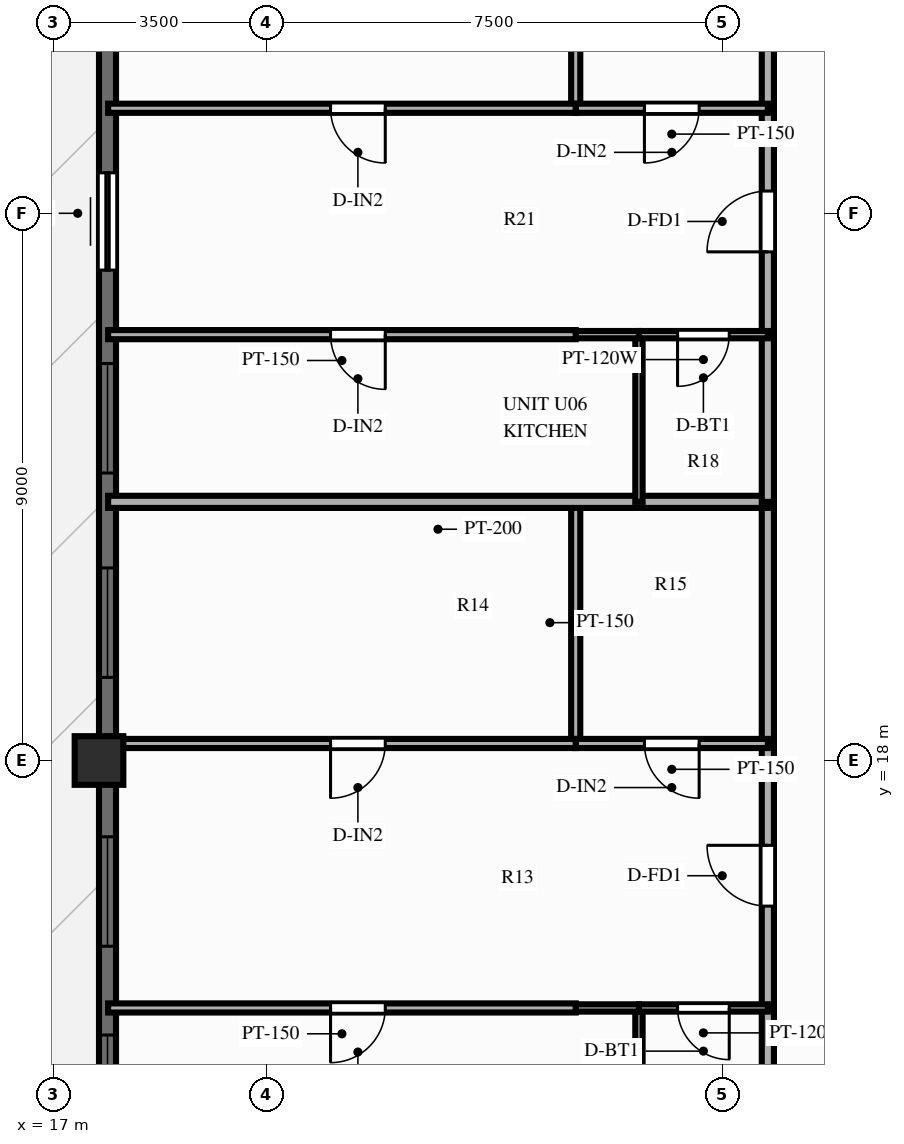
"""IFC4 building model, lengths in metres.
Left out: names, types, materials, properties, quantities, classifications, styles, units other than length and angle.
Written with IfcOpenShell. Run it as: python <this file> out.ifc"""

import sys

from ifc_helpers import new_model, si_unit, direction, frame, frame_2d, origin, origin_2d, place, context, subcontext, project, spatial, rectangle, extrude, source, transform, mapped, element, fill, save


model = new_model("IFC4")
c1 = context("Model", 3, precision=1e-05, world=origin(), true_north=direction((0.0, 1.0)))
c2 = subcontext(c1, "Body", "Model", "MODEL_VIEW")
j1 = project(units=[si_unit("LENGTHUNIT", "METRE"), si_unit("PLANEANGLEUNIT", "RADIAN")], contexts=[c1])
p1 = place(None, origin())
s1 = spatial("IfcSite", under=j1, at=p1, CompositionType="ELEMENT")
p2 = place(p1, origin())
s2 = spatial("IfcBuilding", under=s1, at=p2, CompositionType="ELEMENT")
p3 = place(p2, frame((0.0, 0.0, 182.8)))
s3 = spatial("IfcBuildingStorey", under=s2, at=p3, CompositionType="ELEMENT", Elevation=182.8)
m1 = source(origin(), c2, "Body", "SweptSolid", [
    extrude(rectangle(XDim=0.8, YDim=0.8, at=origin_2d()), origin(), (0.0, 0.0, 1.0), 3.9),
])
p4 = place(p3, frame((17.75, 18.0, 0.0), z_axis=(0.0, 0.0, 1.0), x_axis=(1.0, 0.0, 0.0)))
e1 = element("IfcColumn", 1, at=p4, inside=s3, PredefinedType="COLUMN", context=c2, shape_type="MappedRepresentation", body=[
    mapped(m1, transform((0.0, 0.0, 0.0), scale=1.0)),
])
p5 = place(p3, frame((17.89, 11.0, 0.0), z_axis=(0.0, 0.0, 1.0), x_axis=(0.0, 1.0, 0.0)))
e2 = element("IfcWall", 2, at=p5, inside=s3, PredefinedType="SOLIDWALL", context=c2, shape_type="SweptSolid", body=[
    extrude(rectangle(XDim=32.0, YDim=0.28, at=frame_2d((16.0, 0.0))), origin(), (0.0, 0.0, 1.0), 2.79),
])
p6 = place(p5, frame((0.685, 0.0, 0.85)))
e3 = element("IfcOpeningElement", 3, at=p6, cuts=e2, PredefinedType="OPENING", context=c2, shape_type="SweptSolid", body=[
    extrude(rectangle(XDim=1.8, YDim=1.65, at=frame_2d((0.9, 0.825))), frame((0.0, 0.152, 0.0), z_axis=(0.0, -1.0, 0.0), x_axis=(1.0, 0.0, 0.0)), (0.0, 0.0, 1.0), 0.304),
])
p7 = place(p5, frame((3.945, 0.0, 0.85)))
e4 = element("IfcOpeningElement", 4, at=p7, cuts=e2, PredefinedType="OPENING", context=c2, shape_type="SweptSolid", body=[
    extrude(rectangle(XDim=1.8, YDim=1.65, at=frame_2d((0.9, 0.825))), frame((0.0, 0.152, 0.0), z_axis=(0.0, -1.0, 0.0), x_axis=(1.0, 0.0, 0.0)), (0.0, 0.0, 1.0), 0.304),
])
p8 = place(p5, frame((8.367, 0.0, 0.85)))
e5 = element("IfcOpeningElement", 5, at=p8, cuts=e2, PredefinedType="OPENING", context=c2, shape_type="SweptSolid", body=[
    extrude(rectangle(XDim=1.8, YDim=1.65, at=frame_2d((0.9, 0.825))), frame((0.0, 0.152, 0.0), z_axis=(0.0, -1.0, 0.0), x_axis=(1.0, 0.0, 0.0)), (0.0, 0.0, 1.0), 0.304),
])
p9 = place(p5, frame((11.729, 0.0, 0.85)))
e6 = element("IfcOpeningElement", 6, at=p9, cuts=e2, PredefinedType="OPENING", context=c2, shape_type="SweptSolid", body=[
    extrude(rectangle(XDim=1.8, YDim=1.65, at=frame_2d((0.9, 0.825))), frame((0.0, 0.152, 0.0), z_axis=(0.0, -1.0, 0.0), x_axis=(1.0, 0.0, 0.0)), (0.0, 0.0, 1.0), 0.304),
])
p10 = place(p5, frame((15.066, 0.0, 0.0)))
e7 = element("IfcOpeningElement", 7, at=p10, cuts=e2, PredefinedType="OPENING", context=c2, shape_type="SweptSolid", body=[
    extrude(rectangle(XDim=1.6, YDim=2.15, at=frame_2d((0.8, 1.075))), frame((0.0, 0.152, 0.0), z_axis=(0.0, -1.0, 0.0), x_axis=(1.0, 0.0, 0.0)), (0.0, 0.0, 1.0), 0.304),
])
p11 = place(p5, frame((18.811, 0.0, 0.85)))
e8 = element("IfcOpeningElement", 8, at=p11, cuts=e2, PredefinedType="OPENING", context=c2, shape_type="SweptSolid", body=[
    extrude(rectangle(XDim=1.8, YDim=1.65, at=frame_2d((0.9, 0.825))), frame((0.0, 0.152, 0.0), z_axis=(0.0, -1.0, 0.0), x_axis=(1.0, 0.0, 0.0)), (0.0, 0.0, 1.0), 0.304),
])
p12 = place(p5, frame((22.17, 0.0, 0.85)))
e9 = element("IfcOpeningElement", 9, at=p12, cuts=e2, PredefinedType="OPENING", context=c2, shape_type="SweptSolid", body=[
    extrude(rectangle(XDim=1.8, YDim=1.65, at=frame_2d((0.9, 0.825))), frame((0.0, 0.152, 0.0), z_axis=(0.0, -1.0, 0.0), x_axis=(1.0, 0.0, 0.0)), (0.0, 0.0, 1.0), 0.304),
])
p13 = place(p5, frame((25.706, 0.0, 0.85)))
e10 = element("IfcOpeningElement", 10, at=p13, cuts=e2, PredefinedType="OPENING", context=c2, shape_type="SweptSolid", body=[
    extrude(rectangle(XDim=1.8, YDim=1.65, at=frame_2d((0.9, 0.825))), frame((0.0, 0.152, 0.0), z_axis=(0.0, -1.0, 0.0), x_axis=(1.0, 0.0, 0.0)), (0.0, 0.0, 1.0), 0.304),
])
p14 = place(p5, frame((28.966, 0.0, 0.85)))
e11 = element("IfcOpeningElement", 11, at=p14, cuts=e2, PredefinedType="OPENING", context=c2, shape_type="SweptSolid", body=[
    extrude(rectangle(XDim=1.8, YDim=1.65, at=frame_2d((0.9, 0.825))), frame((0.0, 0.152, 0.0), z_axis=(0.0, -1.0, 0.0), x_axis=(1.0, 0.0, 0.0)), (0.0, 0.0, 1.0), 0.304),
])
p15 = place(p3, frame((28.75, 11.18, 0.0), z_axis=(0.0, 0.0, 1.0), x_axis=(0.0, 1.0, 0.0)))
e12 = element("IfcWall", 12, at=p15, inside=s3, PredefinedType="PARTITIONING", context=c2, shape_type="SweptSolid", body=[
    extrude(rectangle(XDim=2.75, YDim=0.2, at=frame_2d((1.375, 0.0))), origin(), (0.0, 0.0, 1.0), 3.69),
])
p16 = place(p3, frame((28.75, 13.93, 0.0), z_axis=(0.0, 0.0, 1.0), x_axis=(0.0, 1.0, 0.0)))
e13 = element("IfcWall", 13, at=p16, inside=s3, PredefinedType="PARTITIONING", context=c2, shape_type="SweptSolid", body=[
    extrude(rectangle(XDim=4.35, YDim=0.2, at=frame_2d((2.175, 0.0))), origin(), (0.0, 0.0, 1.0), 3.69),
])
p17 = place(p16, frame((1.675, 0.0, 0.0)))
e14 = element("IfcOpeningElement", 14, at=p17, cuts=e13, PredefinedType="OPENING", context=c2, shape_type="SweptSolid", body=[
    extrude(rectangle(XDim=1.0, YDim=2.15, at=frame_2d((0.5, 1.075))), frame((0.0, 0.112, 0.0), z_axis=(0.0, -1.0, 0.0), x_axis=(1.0, 0.0, 0.0)), (0.0, 0.0, 1.0), 0.224),
])
p18 = place(p3, frame((28.75, 18.28, 0.0), z_axis=(0.0, 0.0, 1.0), x_axis=(0.0, 1.0, 0.0)))
e15 = element("IfcWall", 15, at=p18, inside=s3, PredefinedType="PARTITIONING", context=c2, shape_type="SweptSolid", body=[
    extrude(rectangle(XDim=3.974, YDim=0.2, at=frame_2d((1.987, 0.0))), origin(), (0.0, 0.0, 1.0), 3.69),
])
p19 = place(p3, frame((26.63, 11.18, 0.0), z_axis=(0.0, 0.0, 1.0), x_axis=(0.0, 1.0, 0.0)))
e16 = element("IfcWall", 16, at=p19, inside=s3, PredefinedType="PARTITIONING", context=c2, shape_type="SweptSolid", body=[
    extrude(rectangle(XDim=2.75, YDim=0.12, at=frame_2d((1.375, 0.0))), origin(), (0.0, 0.0, 1.0), 3.69),
])
p20 = place(p3, frame((25.59, 18.28, 0.0), z_axis=(0.0, 0.0, 1.0), x_axis=(0.0, 1.0, 0.0)))
e17 = element("IfcWall", 17, at=p20, inside=s3, PredefinedType="PARTITIONING", context=c2, shape_type="SweptSolid", body=[
    extrude(rectangle(XDim=3.974, YDim=0.15, at=frame_2d((1.987, 0.0))), origin(), (0.0, 0.0, 1.0), 3.69),
])
p21 = place(p3, frame((28.75, 13.93, 0.0), z_axis=(0.0, 0.0, 1.0), x_axis=(-1.0, 0.0, 0.0)))
e18 = element("IfcWall", 18, at=p21, inside=s3, PredefinedType="PARTITIONING", context=c2, shape_type="SweptSolid", body=[
    extrude(rectangle(XDim=2.12, YDim=0.12, at=frame_2d((1.06, 0.0))), origin(), (0.0, 0.0, 1.0), 3.69),
])
p22 = place(p21, frame((0.635, 0.0, 0.0)))
e19 = element("IfcOpeningElement", 19, at=p22, cuts=e18, PredefinedType="OPENING", context=c2, shape_type="SweptSolid", body=[
    extrude(rectangle(XDim=0.85, YDim=2.05, at=frame_2d((0.425, 1.025))), frame((0.0, 0.072, 0.0), z_axis=(0.0, -1.0, 0.0), x_axis=(1.0, 0.0, 0.0)), (0.0, 0.0, 1.0), 0.144),
])
p23 = place(p3, frame((26.63, 13.93, 0.0), z_axis=(0.0, 0.0, 1.0), x_axis=(-1.0, 0.0, 0.0)))
e20 = element("IfcWall", 20, at=p23, inside=s3, PredefinedType="PARTITIONING", context=c2, shape_type="SweptSolid", body=[
    extrude(rectangle(XDim=1.04, YDim=0.12, at=frame_2d((0.52, 0.0))), origin(), (0.0, 0.0, 1.0), 3.69),
])
p24 = place(p3, frame((25.59, 13.93, 0.0), z_axis=(0.0, 0.0, 1.0), x_axis=(-1.0, 0.0, 0.0)))
e21 = element("IfcWall", 21, at=p24, inside=s3, PredefinedType="PARTITIONING", context=c2, shape_type="SweptSolid", body=[
    extrude(rectangle(XDim=7.69, YDim=0.15, at=frame_2d((3.845, 0.0))), origin(), (0.0, 0.0, 1.0), 3.69),
])
p25 = place(p24, frame((3.132, 0.0, 0.0)))
e22 = element("IfcOpeningElement", 22, at=p25, cuts=e21, PredefinedType="OPENING", context=c2, shape_type="SweptSolid", body=[
    extrude(rectangle(XDim=0.9, YDim=2.1, at=frame_2d((0.45, 1.05))), frame((0.0, 0.087, 0.0), z_axis=(0.0, -1.0, 0.0), x_axis=(1.0, 0.0, 0.0)), (0.0, 0.0, 1.0), 0.174),
])
p26 = place(p3, frame((28.75, 18.28, 0.0), z_axis=(0.0, 0.0, 1.0), x_axis=(-1.0, 0.0, 0.0)))
e23 = element("IfcWall", 23, at=p26, inside=s3, PredefinedType="PARTITIONING", context=c2, shape_type="SweptSolid", body=[
    extrude(rectangle(XDim=3.16, YDim=0.15, at=frame_2d((1.58, 0.0))), origin(), (0.0, 0.0, 1.0), 3.69),
])
p27 = place(p26, frame((1.13, 0.0, 0.0)))
e24 = element("IfcOpeningElement", 24, at=p27, cuts=e23, PredefinedType="OPENING", context=c2, shape_type="SweptSolid", body=[
    extrude(rectangle(XDim=0.9, YDim=2.1, at=frame_2d((0.45, 1.05))), frame((0.0, 0.087, 0.0), z_axis=(0.0, -1.0, 0.0), x_axis=(1.0, 0.0, 0.0)), (0.0, 0.0, 1.0), 0.174),
])
p28 = place(p3, frame((25.59, 18.28, 0.0), z_axis=(0.0, 0.0, 1.0), x_axis=(-1.0, 0.0, 0.0)))
e25 = element("IfcWall", 25, at=p28, inside=s3, PredefinedType="PARTITIONING", context=c2, shape_type="SweptSolid", body=[
    extrude(rectangle(XDim=7.69, YDim=0.15, at=frame_2d((3.845, 0.0))), origin(), (0.0, 0.0, 1.0), 3.69),
])
p29 = place(p28, frame((3.132, 0.0, 0.0)))
e26 = element("IfcOpeningElement", 26, at=p29, cuts=e25, PredefinedType="OPENING", context=c2, shape_type="SweptSolid", body=[
    extrude(rectangle(XDim=0.9, YDim=2.1, at=frame_2d((0.45, 1.05))), frame((0.0, 0.087, 0.0), z_axis=(0.0, -1.0, 0.0), x_axis=(1.0, 0.0, 0.0)), (0.0, 0.0, 1.0), 0.174),
])
p30 = place(p3, frame((28.75, 22.254, 0.0), z_axis=(0.0, 0.0, 1.0), x_axis=(-1.0, 0.0, 0.0)))
e27 = element("IfcWall", 27, at=p30, inside=s3, PredefinedType="PARTITIONING", context=c2, shape_type="SweptSolid", body=[
    extrude(rectangle(XDim=10.85, YDim=0.2, at=frame_2d((5.425, 0.0))), origin(), (0.0, 0.0, 1.0), 3.29),
])
p31 = place(p3, frame((28.75, 22.254, 0.0), z_axis=(0.0, 0.0, 1.0), x_axis=(0.0, 1.0, 0.0)))
e28 = element("IfcWall", 28, at=p31, inside=s3, PredefinedType="PARTITIONING", context=c2, shape_type="SweptSolid", body=[
    extrude(rectangle(XDim=2.75, YDim=0.2, at=frame_2d((1.375, 0.0))), origin(), (0.0, 0.0, 1.0), 3.69),
])
p32 = place(p3, frame((28.75, 25.004, 0.0), z_axis=(0.0, 0.0, 1.0), x_axis=(0.0, 1.0, 0.0)))
e29 = element("IfcWall", 29, at=p32, inside=s3, PredefinedType="PARTITIONING", context=c2, shape_type="SweptSolid", body=[
    extrude(rectangle(XDim=3.724, YDim=0.2, at=frame_2d((1.862, 0.0))), origin(), (0.0, 0.0, 1.0), 3.69),
])
p33 = place(p32, frame((1.362, 0.0, 0.0)))
e30 = element("IfcOpeningElement", 30, at=p33, cuts=e29, PredefinedType="OPENING", context=c2, shape_type="SweptSolid", body=[
    extrude(rectangle(XDim=1.0, YDim=2.15, at=frame_2d((0.5, 1.075))), frame((0.0, 0.112, 0.0), z_axis=(0.0, -1.0, 0.0), x_axis=(1.0, 0.0, 0.0)), (0.0, 0.0, 1.0), 0.224),
])
p34 = place(p3, frame((28.75, 28.728, 0.0), z_axis=(0.0, 0.0, 1.0), x_axis=(0.0, 1.0, 0.0)))
e31 = element("IfcWall", 31, at=p34, inside=s3, PredefinedType="PARTITIONING", context=c2, shape_type="SweptSolid", body=[
    extrude(rectangle(XDim=3.968, YDim=0.2, at=frame_2d((1.984, 0.0))), origin(), (0.0, 0.0, 1.0), 3.69),
])
p35 = place(p3, frame((26.63, 22.254, 0.0), z_axis=(0.0, 0.0, 1.0), x_axis=(0.0, 1.0, 0.0)))
e32 = element("IfcWall", 32, at=p35, inside=s3, PredefinedType="PARTITIONING", context=c2, shape_type="SweptSolid", body=[
    extrude(rectangle(XDim=2.75, YDim=0.12, at=frame_2d((1.375, 0.0))), origin(), (0.0, 0.0, 1.0), 3.69),
])
p36 = place(p3, frame((25.59, 28.728, 0.0), z_axis=(0.0, 0.0, 1.0), x_axis=(0.0, 1.0, 0.0)))
e33 = element("IfcWall", 33, at=p36, inside=s3, PredefinedType="PARTITIONING", context=c2, shape_type="SweptSolid", body=[
    extrude(rectangle(XDim=3.968, YDim=0.15, at=frame_2d((1.984, 0.0))), origin(), (0.0, 0.0, 1.0), 3.69),
])
p37 = place(p3, frame((28.75, 25.004, 0.0), z_axis=(0.0, 0.0, 1.0), x_axis=(-1.0, 0.0, 0.0)))
e34 = element("IfcWall", 34, at=p37, inside=s3, PredefinedType="PARTITIONING", context=c2, shape_type="SweptSolid", body=[
    extrude(rectangle(XDim=2.12, YDim=0.12, at=frame_2d((1.06, 0.0))), origin(), (0.0, 0.0, 1.0), 3.69),
])
p38 = place(p37, frame((0.635, 0.0, 0.0)))
e35 = element("IfcOpeningElement", 35, at=p38, cuts=e34, PredefinedType="OPENING", context=c2, shape_type="SweptSolid", body=[
    extrude(rectangle(XDim=0.85, YDim=2.05, at=frame_2d((0.425, 1.025))), frame((0.0, 0.072, 0.0), z_axis=(0.0, -1.0, 0.0), x_axis=(1.0, 0.0, 0.0)), (0.0, 0.0, 1.0), 0.144),
])
p39 = place(p3, frame((26.63, 25.004, 0.0), z_axis=(0.0, 0.0, 1.0), x_axis=(-1.0, 0.0, 0.0)))
e36 = element("IfcWall", 36, at=p39, inside=s3, PredefinedType="PARTITIONING", context=c2, shape_type="SweptSolid", body=[
    extrude(rectangle(XDim=1.04, YDim=0.12, at=frame_2d((0.52, 0.0))), origin(), (0.0, 0.0, 1.0), 3.69),
])
p40 = place(p3, frame((25.59, 25.004, 0.0), z_axis=(0.0, 0.0, 1.0), x_axis=(-1.0, 0.0, 0.0)))
e37 = element("IfcWall", 37, at=p40, inside=s3, PredefinedType="PARTITIONING", context=c2, shape_type="SweptSolid", body=[
    extrude(rectangle(XDim=7.69, YDim=0.15, at=frame_2d((3.845, 0.0))), origin(), (0.0, 0.0, 1.0), 3.69),
])
p41 = place(p40, frame((3.132, 0.0, 0.0)))
e38 = element("IfcOpeningElement", 38, at=p41, cuts=e37, PredefinedType="OPENING", context=c2, shape_type="SweptSolid", body=[
    extrude(rectangle(XDim=0.9, YDim=2.1, at=frame_2d((0.45, 1.05))), frame((0.0, 0.087, 0.0), z_axis=(0.0, -1.0, 0.0), x_axis=(1.0, 0.0, 0.0)), (0.0, 0.0, 1.0), 0.174),
])
p42 = place(p3, frame((28.75, 28.728, 0.0), z_axis=(0.0, 0.0, 1.0), x_axis=(-1.0, 0.0, 0.0)))
e39 = element("IfcWall", 39, at=p42, inside=s3, PredefinedType="PARTITIONING", context=c2, shape_type="SweptSolid", body=[
    extrude(rectangle(XDim=3.16, YDim=0.15, at=frame_2d((1.58, 0.0))), origin(), (0.0, 0.0, 1.0), 3.69),
])
p43 = place(p42, frame((1.13, 0.0, 0.0)))
e40 = element("IfcOpeningElement", 40, at=p43, cuts=e39, PredefinedType="OPENING", context=c2, shape_type="SweptSolid", body=[
    extrude(rectangle(XDim=0.9, YDim=2.1, at=frame_2d((0.45, 1.05))), frame((0.0, 0.087, 0.0), z_axis=(0.0, -1.0, 0.0), x_axis=(1.0, 0.0, 0.0)), (0.0, 0.0, 1.0), 0.174),
])
p44 = place(p3, frame((25.59, 28.728, 0.0), z_axis=(0.0, 0.0, 1.0), x_axis=(-1.0, 0.0, 0.0)))
e41 = element("IfcWall", 41, at=p44, inside=s3, PredefinedType="PARTITIONING", context=c2, shape_type="SweptSolid", body=[
    extrude(rectangle(XDim=7.69, YDim=0.15, at=frame_2d((3.845, 0.0))), origin(), (0.0, 0.0, 1.0), 3.69),
])
p45 = place(p44, frame((3.132, 0.0, 0.0)))
e42 = element("IfcOpeningElement", 42, at=p45, cuts=e41, PredefinedType="OPENING", context=c2, shape_type="SweptSolid", body=[
    extrude(rectangle(XDim=0.9, YDim=2.1, at=frame_2d((0.45, 1.05))), frame((0.0, 0.087, 0.0), z_axis=(0.0, -1.0, 0.0), x_axis=(1.0, 0.0, 0.0)), (0.0, 0.0, 1.0), 0.174),
])
m2 = source(origin(), c2, "Body", "SweptSolid", [
    extrude(rectangle(XDim=1.8, YDim=1.65, at=frame_2d((0.9, 0.825))), frame((0.0, 0.03, 0.0), z_axis=(0.0, -1.0, 0.0), x_axis=(1.0, 0.0, 0.0)), (0.0, 0.0, 1.0), 0.06),
])
p46 = place(p6, origin())
e43 = element("IfcWindow", 43, at=p46, inside=s3, PartitioningType="SINGLE_PANEL", PredefinedType="WINDOW", context=c2, shape_type="MappedRepresentation", body=[
    mapped(m2, transform((0.0, 0.0, 0.0), scale=1.0)),
])
fill(e3, e43)
p47 = place(p7, origin())
e44 = element("IfcWindow", 44, at=p47, inside=s3, PartitioningType="SINGLE_PANEL", PredefinedType="WINDOW", context=c2, shape_type="MappedRepresentation", body=[
    mapped(m2, transform((0.0, 0.0, 0.0), scale=1.0)),
])
fill(e4, e44)
p48 = place(p8, origin())
e45 = element("IfcWindow", 45, at=p48, inside=s3, PartitioningType="SINGLE_PANEL", PredefinedType="WINDOW", context=c2, shape_type="MappedRepresentation", body=[
    mapped(m2, transform((0.0, 0.0, 0.0), scale=1.0)),
])
fill(e5, e45)
p49 = place(p9, origin())
e46 = element("IfcWindow", 46, at=p49, inside=s3, PartitioningType="SINGLE_PANEL", PredefinedType="WINDOW", context=c2, shape_type="MappedRepresentation", body=[
    mapped(m2, transform((0.0, 0.0, 0.0), scale=1.0)),
])
fill(e6, e46)
m3 = source(origin(), c2, "Body", "SweptSolid", [
    extrude(rectangle(XDim=1.6, YDim=2.15, at=frame_2d((0.8, 1.075))), frame((0.0, 0.025, 0.0), z_axis=(0.0, -1.0, 0.0), x_axis=(1.0, 0.0, 0.0)), (0.0, 0.0, 1.0), 0.05),
])
p50 = place(p10, origin())
e47 = element("IfcDoor", 47, at=p50, inside=s3, OperationType="SLIDING_TO_LEFT", PredefinedType="DOOR", context=c2, shape_type="MappedRepresentation", body=[
    mapped(m3, transform((0.0, 0.0, 0.0), scale=1.0)),
])
fill(e7, e47)
m4 = source(origin(), c2, "Body", "SweptSolid", [
    extrude(rectangle(XDim=1.0, YDim=2.15, at=frame_2d((0.5, 1.075))), frame((0.0, 0.025, 0.0), z_axis=(0.0, -1.0, 0.0), x_axis=(1.0, 0.0, 0.0)), (0.0, 0.0, 1.0), 0.05),
])
p51 = place(p17, origin())
e48 = element("IfcDoor", 48, at=p51, inside=s3, OperationType="SINGLE_SWING_RIGHT", PredefinedType="DOOR", context=c2, shape_type="MappedRepresentation", body=[
    mapped(m4, transform((0.0, 0.0, 0.0), scale=1.0)),
])
fill(e14, e48)
m5 = source(origin(), c2, "Body", "SweptSolid", [
    extrude(rectangle(XDim=0.85, YDim=2.05, at=frame_2d((0.425, 1.025))), frame((0.0, 0.025, 0.0), z_axis=(0.0, -1.0, 0.0), x_axis=(1.0, 0.0, 0.0)), (0.0, 0.0, 1.0), 0.05),
])
p52 = place(p22, origin())
e49 = element("IfcDoor", 49, at=p52, inside=s3, OperationType="SINGLE_SWING_LEFT", PredefinedType="DOOR", context=c2, shape_type="MappedRepresentation", body=[
    mapped(m5, transform((0.0, 0.0, 0.0), scale=1.0)),
])
fill(e19, e49)
m6 = source(origin(), c2, "Body", "SweptSolid", [
    extrude(rectangle(XDim=0.9, YDim=2.1, at=frame_2d((0.45, 1.05))), frame((0.0, 0.025, 0.0), z_axis=(0.0, -1.0, 0.0), x_axis=(1.0, 0.0, 0.0)), (0.0, 0.0, 1.0), 0.05),
])
p53 = place(p25, origin())
e50 = element("IfcDoor", 50, at=p53, inside=s3, OperationType="SINGLE_SWING_RIGHT", PredefinedType="DOOR", context=c2, shape_type="MappedRepresentation", body=[
    mapped(m6, transform((0.0, 0.0, 0.0), scale=1.0)),
])
fill(e22, e50)
p54 = place(p27, origin())
e51 = element("IfcDoor", 51, at=p54, inside=s3, OperationType="SINGLE_SWING_LEFT", PredefinedType="DOOR", context=c2, shape_type="MappedRepresentation", body=[
    mapped(m6, transform((0.0, 0.0, 0.0), scale=1.0)),
])
fill(e24, e51)
p55 = place(p29, origin())
e52 = element("IfcDoor", 52, at=p55, inside=s3, OperationType="SINGLE_SWING_RIGHT", PredefinedType="DOOR", context=c2, shape_type="MappedRepresentation", body=[
    mapped(m6, transform((0.0, 0.0, 0.0), scale=1.0)),
])
fill(e26, e52)
p56 = place(p33, origin())
e53 = element("IfcDoor", 53, at=p56, inside=s3, OperationType="SINGLE_SWING_LEFT", PredefinedType="DOOR", context=c2, shape_type="MappedRepresentation", body=[
    mapped(m4, transform((0.0, 0.0, 0.0), scale=1.0)),
])
fill(e30, e53)
p57 = place(p38, origin())
e54 = element("IfcDoor", 54, at=p57, inside=s3, OperationType="SINGLE_SWING_RIGHT", PredefinedType="DOOR", context=c2, shape_type="MappedRepresentation", body=[
    mapped(m5, transform((0.0, 0.0, 0.0), scale=1.0)),
])
fill(e35, e54)
p58 = place(p41, origin())
e55 = element("IfcDoor", 55, at=p58, inside=s3, OperationType="SINGLE_SWING_LEFT", PredefinedType="DOOR", context=c2, shape_type="MappedRepresentation", body=[
    mapped(m6, transform((0.0, 0.0, 0.0), scale=1.0)),
])
fill(e38, e55)
p59 = place(p43, origin())
e56 = element("IfcDoor", 56, at=p59, inside=s3, OperationType="SINGLE_SWING_RIGHT", PredefinedType="DOOR", context=c2, shape_type="MappedRepresentation", body=[
    mapped(m6, transform((0.0, 0.0, 0.0), scale=1.0)),
])
fill(e40, e56)
p60 = place(p45, origin())
e57 = element("IfcDoor", 57, at=p60, inside=s3, OperationType="SINGLE_SWING_LEFT", PredefinedType="DOOR", context=c2, shape_type="MappedRepresentation", body=[
    mapped(m6, transform((0.0, 0.0, 0.0), scale=1.0)),
])
fill(e42, e57)
save(model, sys.argv[1])
